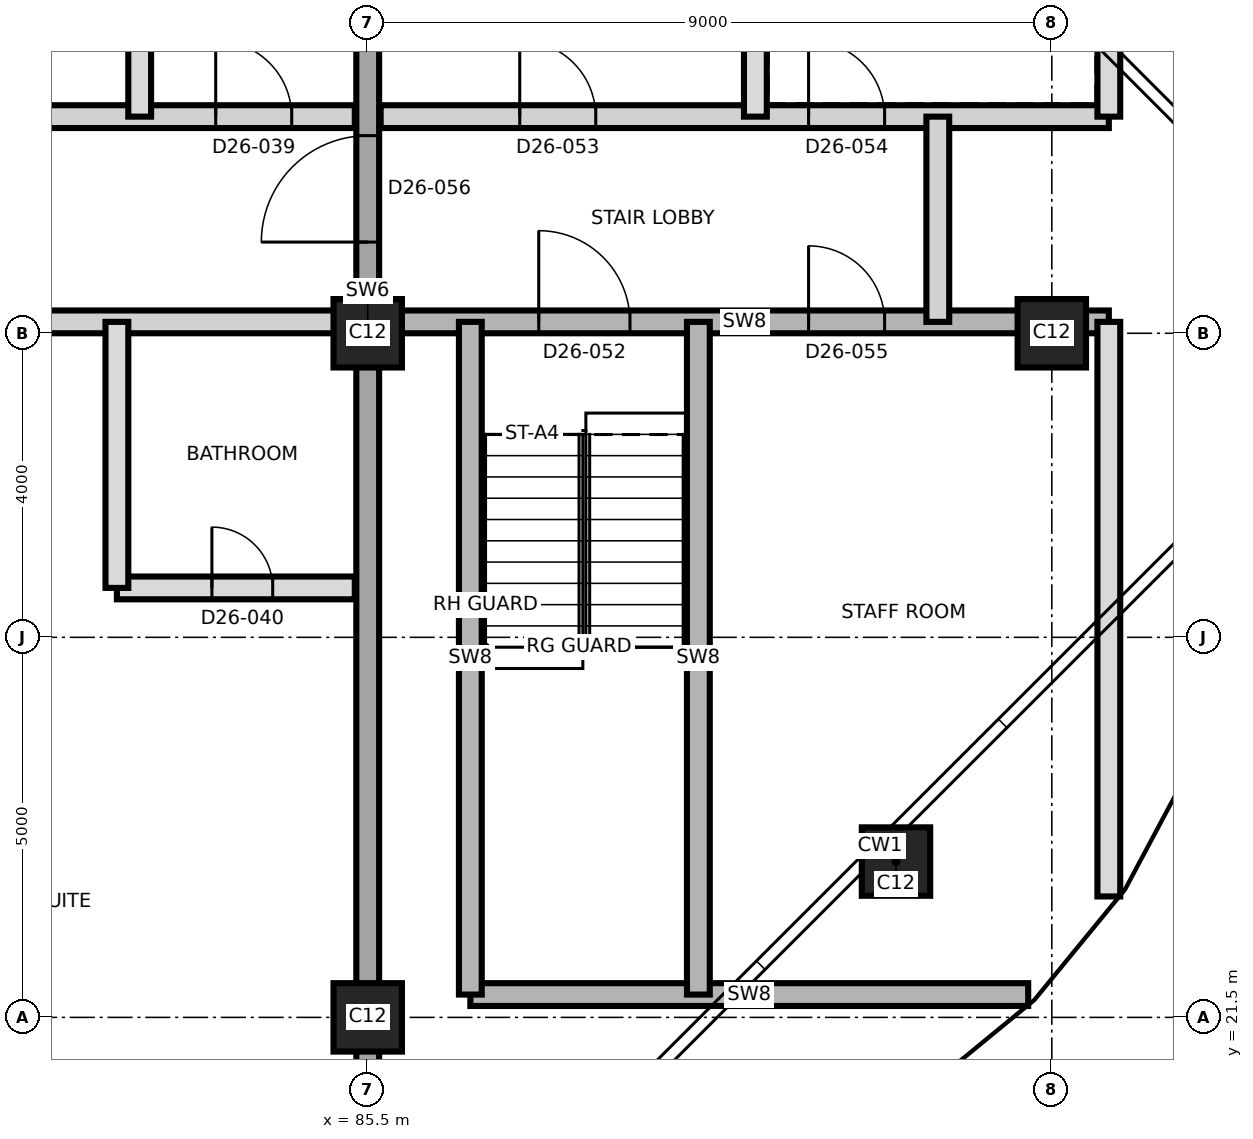
"""IFC4 building model, lengths in metres.
Left out: names, types, materials, properties, quantities, classifications, styles, units other than length and angle.
Written with IfcOpenShell. Run it as: python <this file> out.ifc"""

import sys

from ifc_helpers import new_model, si_unit, direction, frame, frame_2d, origin, origin_2d, place, context, subcontext, project, spatial, rectangle, extrude, element, fill, save


model = new_model("IFC4")
c1 = context("Model", 3, precision=1e-05, world=origin(), true_north=direction((0.0, 1.0)))
c2 = subcontext(c1, "Body", "Model", "MODEL_VIEW")
j1 = project(units=[si_unit("LENGTHUNIT", "METRE"), si_unit("PLANEANGLEUNIT", "RADIAN")], contexts=[c1])
p1 = place(None, origin())
s1 = spatial("IfcSite", under=j1, at=p1, CompositionType="ELEMENT")
p2 = place(p1, origin())
s2 = spatial("IfcBuilding", under=s1, at=p2, CompositionType="ELEMENT")
p3 = place(p2, frame((0.0, 0.0, 236.5)))
s3 = spatial("IfcBuildingStorey", under=s2, at=p3, CompositionType="ELEMENT", Elevation=236.5)
for number, where, z_axis, x_axis in (
    (1, (85.5, 21.5, 0.0), (0.0, 0.0, 1.0), (1.0, 0.0, 0.0)),
    (2, (92.45, 23.55, 0.0), (0.0, 0.0, 1.0), (1.0, 0.0, 0.0)),
    (3, (85.5, 30.5, 0.0), (0.0, 0.0, 1.0), (1.0, 0.0, 0.0)),
    (4, (94.5, 30.5, 0.0), (0.0, 0.0, 1.0), (1.0, 0.0, 0.0)),
):
    element("IfcColumn", number, at=place(p3, frame(where, z_axis=z_axis, x_axis=x_axis)), inside=s3, PredefinedType="COLUMN", context=c2, shape_type="SweptSolid", body=[
        extrude(rectangle(XDim=0.9, YDim=0.9, at=origin_2d()), origin(), (0.0, 0.0, 1.0), 3.7),
    ])
p4 = place(p3, frame((85.5, 19.275, 0.0), z_axis=(0.0, 0.0, 1.0), x_axis=(0.0, 1.0, 0.0)))
e5 = element("IfcWall", 5, at=p4, inside=s3, PredefinedType="SHEAR", context=c2, shape_type="SweptSolid", body=[
    extrude(rectangle(XDim=22.45, YDim=0.3, at=frame_2d((11.225, 0.0))), origin(), (0.0, 0.0, 1.0), 3.7),
])
p5 = place(p4, frame((12.425, 0.0, 0.0)))
e6 = element("IfcOpeningElement", 6, at=p5, cuts=e5, PredefinedType="OPENING", context=c2, shape_type="SweptSolid", body=[
    extrude(rectangle(XDim=1.4, YDim=2.1, at=frame_2d((0.7, 1.05))), frame((0.0, 0.16, 0.0), z_axis=(0.0, -1.0, 0.0), x_axis=(1.0, 0.0, 0.0)), (0.0, 0.0, 1.0), 0.32),
])
p6 = place(p3, frame((86.85, 21.8, 0.0), z_axis=(0.0, 0.0, 1.0), x_axis=(1.0, 0.0, 0.0)))
e7 = element("IfcWall", 7, at=p6, inside=s3, PredefinedType="SHEAR", context=c2, shape_type="SweptSolid", body=[
    extrude(rectangle(XDim=7.339, YDim=0.3, at=frame_2d((3.669, 0.0))), origin(), (0.0, 0.0, 1.0), 3.4),
])
p7 = place(p3, frame((82.2, 27.15, 0.0), z_axis=(0.0, 0.0, 1.0), x_axis=(1.0, 0.0, 0.0)))
e8 = element("IfcWall", 8, at=p7, inside=s3, PredefinedType="PARTITIONING", context=c2, shape_type="SweptSolid", body=[
    extrude(rectangle(XDim=3.13, YDim=0.3, at=frame_2d((1.565, 0.0))), origin(), (0.0, 0.0, 1.0), 3.4),
])
p8 = place(p7, frame((1.25, 0.0, 0.0)))
e9 = element("IfcOpeningElement", 9, at=p8, cuts=e8, PredefinedType="OPENING", context=c2, shape_type="SweptSolid", body=[
    extrude(rectangle(XDim=0.8, YDim=2.1, at=frame_2d((0.4, 1.05))), frame((0.0, 0.16, 0.0), z_axis=(0.0, -1.0, 0.0), x_axis=(1.0, 0.0, 0.0)), (0.0, 0.0, 1.0), 0.32),
])
p9 = place(p3, frame((58.55, 30.65, 0.0), z_axis=(0.0, 0.0, 1.0), x_axis=(1.0, 0.0, 0.0)))
e10 = element("IfcWall", 10, at=p9, inside=s3, PredefinedType="PARTITIONING", context=c2, shape_type="SweptSolid", body=[
    extrude(rectangle(XDim=26.78, YDim=0.3, at=frame_2d((13.39, 0.0))), origin(), (0.0, 0.0, 1.0), 3.4),
])
p10 = place(p9, frame((1.085, 0.0, 0.0)))
e11 = element("IfcOpeningElement", 11, at=p10, cuts=e10, PredefinedType="OPENING", context=c2, shape_type="SweptSolid", body=[
    extrude(rectangle(XDim=1.2, YDim=2.1, at=frame_2d((0.6, 1.05))), frame((0.0, 0.16, 0.0), z_axis=(0.0, -1.0, 0.0), x_axis=(1.0, 0.0, 0.0)), (0.0, 0.0, 1.0), 0.32),
])
p11 = place(p9, frame((4.335, 0.0, 0.0)))
e12 = element("IfcOpeningElement", 12, at=p11, cuts=e10, PredefinedType="OPENING", context=c2, shape_type="SweptSolid", body=[
    extrude(rectangle(XDim=1.0, YDim=2.1, at=frame_2d((0.5, 1.05))), frame((0.0, 0.16, 0.0), z_axis=(0.0, -1.0, 0.0), x_axis=(1.0, 0.0, 0.0)), (0.0, 0.0, 1.0), 0.32),
])
p12 = place(p9, frame((14.6, 0.0, 0.0)))
e13 = element("IfcOpeningElement", 13, at=p12, cuts=e10, PredefinedType="OPENING", context=c2, shape_type="SweptSolid", body=[
    extrude(rectangle(XDim=1.0, YDim=2.4, at=frame_2d((0.5, 1.2))), frame((0.0, 0.16, 0.0), z_axis=(0.0, -1.0, 0.0), x_axis=(1.0, 0.0, 0.0)), (0.0, 0.0, 1.0), 0.32),
])
p13 = place(p9, frame((20.3, 0.0, 0.0)))
e14 = element("IfcOpeningElement", 14, at=p13, cuts=e10, PredefinedType="OPENING", context=c2, shape_type="SweptSolid", body=[
    extrude(rectangle(XDim=1.0, YDim=2.4, at=frame_2d((0.5, 1.2))), frame((0.0, 0.16, 0.0), z_axis=(0.0, -1.0, 0.0), x_axis=(1.0, 0.0, 0.0)), (0.0, 0.0, 1.0), 0.32),
])
p14 = place(p3, frame((85.67, 30.65, 0.0), z_axis=(0.0, 0.0, 1.0), x_axis=(1.0, 0.0, 0.0)))
e15 = element("IfcWall", 15, at=p14, inside=s3, PredefinedType="SHEAR", context=c2, shape_type="SweptSolid", body=[
    extrude(rectangle(XDim=9.58, YDim=0.3, at=frame_2d((4.79, 0.0))), origin(), (0.0, 0.0, 1.0), 3.4),
])
p15 = place(p14, frame((2.08, 0.0, 0.0)))
e16 = element("IfcOpeningElement", 16, at=p15, cuts=e15, PredefinedType="OPENING", context=c2, shape_type="SweptSolid", body=[
    extrude(rectangle(XDim=1.2, YDim=2.1, at=frame_2d((0.6, 1.05))), frame((0.0, 0.16, 0.0), z_axis=(0.0, -1.0, 0.0), x_axis=(1.0, 0.0, 0.0)), (0.0, 0.0, 1.0), 0.32),
])
p16 = place(p14, frame((5.63, 0.0, 0.0)))
e17 = element("IfcOpeningElement", 17, at=p16, cuts=e15, PredefinedType="OPENING", context=c2, shape_type="SweptSolid", body=[
    extrude(rectangle(XDim=1.0, YDim=2.1, at=frame_2d((0.5, 1.05))), frame((0.0, 0.16, 0.0), z_axis=(0.0, -1.0, 0.0), x_axis=(1.0, 0.0, 0.0)), (0.0, 0.0, 1.0), 0.32),
])
p17 = place(p3, frame((58.55, 33.35, 0.0), z_axis=(0.0, 0.0, 1.0), x_axis=(1.0, 0.0, 0.0)))
e18 = element("IfcWall", 18, at=p17, inside=s3, PredefinedType="PARTITIONING", context=c2, shape_type="SweptSolid", body=[
    extrude(rectangle(XDim=26.78, YDim=0.3, at=frame_2d((13.39, 0.0))), origin(), (0.0, 0.0, 1.0), 3.4),
])
p18 = place(p17, frame((3.95, 0.0, 0.0)))
e19 = element("IfcOpeningElement", 19, at=p18, cuts=e18, PredefinedType="OPENING", context=c2, shape_type="SweptSolid", body=[
    extrude(rectangle(XDim=1.0, YDim=2.4, at=frame_2d((0.5, 1.2))), frame((0.0, 0.16, 0.0), z_axis=(0.0, -1.0, 0.0), x_axis=(1.0, 0.0, 0.0)), (0.0, 0.0, 1.0), 0.32),
])
p19 = place(p17, frame((12.365, 0.0, 0.0)))
e20 = element("IfcOpeningElement", 20, at=p19, cuts=e18, PredefinedType="OPENING", context=c2, shape_type="SweptSolid", body=[
    extrude(rectangle(XDim=1.0, YDim=2.1, at=frame_2d((0.5, 1.05))), frame((0.0, 0.16, 0.0), z_axis=(0.0, -1.0, 0.0), x_axis=(1.0, 0.0, 0.0)), (0.0, 0.0, 1.0), 0.32),
])
p20 = place(p17, frame((15.315, 0.0, 0.0)))
e21 = element("IfcOpeningElement", 21, at=p20, cuts=e18, PredefinedType="OPENING", context=c2, shape_type="SweptSolid", body=[
    extrude(rectangle(XDim=1.4, YDim=2.1, at=frame_2d((0.7, 1.05))), frame((0.0, 0.16, 0.0), z_axis=(0.0, -1.0, 0.0), x_axis=(1.0, 0.0, 0.0)), (0.0, 0.0, 1.0), 0.32),
])
p21 = place(p17, frame((19.1, 0.0, 0.0)))
e22 = element("IfcOpeningElement", 22, at=p21, cuts=e18, PredefinedType="OPENING", context=c2, shape_type="SweptSolid", body=[
    extrude(rectangle(XDim=1.0, YDim=2.1, at=frame_2d((0.5, 1.05))), frame((0.0, 0.16, 0.0), z_axis=(0.0, -1.0, 0.0), x_axis=(1.0, 0.0, 0.0)), (0.0, 0.0, 1.0), 0.32),
])
p22 = place(p17, frame((24.95, 0.0, 0.0)))
e23 = element("IfcOpeningElement", 23, at=p22, cuts=e18, PredefinedType="OPENING", context=c2, shape_type="SweptSolid", body=[
    extrude(rectangle(XDim=1.0, YDim=2.1, at=frame_2d((0.5, 1.05))), frame((0.0, 0.16, 0.0), z_axis=(0.0, -1.0, 0.0), x_axis=(1.0, 0.0, 0.0)), (0.0, 0.0, 1.0), 0.32),
])
p23 = place(p3, frame((85.67, 33.35, 0.0), z_axis=(0.0, 0.0, 1.0), x_axis=(1.0, 0.0, 0.0)))
e24 = element("IfcWall", 24, at=p23, inside=s3, PredefinedType="PARTITIONING", context=c2, shape_type="SweptSolid", body=[
    extrude(rectangle(XDim=9.58, YDim=0.3, at=frame_2d((4.79, 0.0))), origin(), (0.0, 0.0, 1.0), 3.4),
])
p24 = place(p23, frame((1.83, 0.0, 0.0)))
e25 = element("IfcOpeningElement", 25, at=p24, cuts=e24, PredefinedType="OPENING", context=c2, shape_type="SweptSolid", body=[
    extrude(rectangle(XDim=1.0, YDim=2.1, at=frame_2d((0.5, 1.05))), frame((0.0, 0.16, 0.0), z_axis=(0.0, -1.0, 0.0), x_axis=(1.0, 0.0, 0.0)), (0.0, 0.0, 1.0), 0.32),
])
p25 = place(p23, frame((5.63, 0.0, 0.0)))
e26 = element("IfcOpeningElement", 26, at=p25, cuts=e24, PredefinedType="OPENING", context=c2, shape_type="SweptSolid", body=[
    extrude(rectangle(XDim=1.0, YDim=2.1, at=frame_2d((0.5, 1.05))), frame((0.0, 0.16, 0.0), z_axis=(0.0, -1.0, 0.0), x_axis=(1.0, 0.0, 0.0)), (0.0, 0.0, 1.0), 0.32),
])
p26 = place(p3, frame((82.2, 27.15, 0.0), z_axis=(0.0, 0.0, 1.0), x_axis=(0.0, 1.0, 0.0)))
e27 = element("IfcWall", 27, at=p26, inside=s3, PredefinedType="PARTITIONING", context=c2, shape_type="SweptSolid", body=[
    extrude(rectangle(XDim=3.5, YDim=0.3, at=frame_2d((1.75, 0.0))), origin(), (0.0, 0.0, 1.0), 3.4),
])
p27 = place(p3, frame((82.5, 33.35, 0.0), z_axis=(0.0, 0.0, 1.0), x_axis=(0.0, 1.0, 0.0)))
e28 = element("IfcWall", 28, at=p27, inside=s3, PredefinedType="PARTITIONING", context=c2, shape_type="SweptSolid", body=[
    extrude(rectangle(XDim=8.555, YDim=0.3, at=frame_2d((4.277, 0.0))), origin(), (0.0, 0.0, 1.0), 3.4),
])
for number, where, z_axis, x_axis in (
    (29, (86.85, 21.8, 0.0), (0.0, 0.0, 1.0), (0.0, 1.0, 0.0)),
    (30, (89.85, 21.8, 0.0), (0.0, 0.0, 1.0), (0.0, 1.0, 0.0)),
):
    element("IfcWall", number, at=place(p3, frame(where, z_axis=z_axis, x_axis=x_axis)), inside=s3, PredefinedType="SHEAR", context=c2, shape_type="SweptSolid", body=[
        extrude(rectangle(XDim=8.85, YDim=0.3, at=frame_2d((4.425, 0.0))), origin(), (0.0, 0.0, 1.0), 3.4),
    ])
p28 = place(p3, frame((90.6, 33.35, 0.0), z_axis=(0.0, 0.0, 1.0), x_axis=(0.0, 1.0, 0.0)))
e31 = element("IfcWall", 31, at=p28, inside=s3, PredefinedType="PARTITIONING", context=c2, shape_type="SweptSolid", body=[
    extrude(rectangle(XDim=7.5, YDim=0.3, at=frame_2d((3.75, 0.0))), origin(), (0.0, 0.0, 1.0), 3.4),
])
p29 = place(p3, frame((93.0, 30.65, 0.0), z_axis=(0.0, 0.0, 1.0), x_axis=(0.0, 1.0, 0.0)))
e32 = element("IfcWall", 32, at=p29, inside=s3, PredefinedType="PARTITIONING", context=c2, shape_type="SweptSolid", body=[
    extrude(rectangle(XDim=2.7, YDim=0.3, at=frame_2d((1.35, 0.0))), origin(), (0.0, 0.0, 1.0), 3.4),
])
p30 = place(p3, frame((95.25, 23.091, 0.0), z_axis=(0.0, 0.0, 1.0), x_axis=(0.0, 1.0, 0.0)))
e33 = element("IfcWall", 33, at=p30, inside=s3, PredefinedType="PARTITIONING", context=c2, shape_type="SweptSolid", body=[
    extrude(rectangle(XDim=7.559, YDim=0.3, at=frame_2d((3.779, 0.0))), origin(), (0.0, 0.0, 1.0), 3.4),
])
p31 = place(p3, frame((95.25, 33.35, 0.0), z_axis=(0.0, 0.0, 1.0), x_axis=(0.0, 1.0, 0.0)))
e34 = element("IfcWall", 34, at=p31, inside=s3, PredefinedType="PARTITIONING", context=c2, shape_type="SweptSolid", body=[
    extrude(rectangle(XDim=4.559, YDim=0.3, at=frame_2d((2.279, 0.0))), origin(), (0.0, 0.0, 1.0), 3.4),
])
p32 = place(p22, origin())
e35 = element("IfcDoor", 35, at=p32, inside=s3, OperationType="SINGLE_SWING_LEFT", PredefinedType="DOOR", context=c2, shape_type="SweptSolid", body=[
    extrude(rectangle(XDim=1.0, YDim=2.1, at=frame_2d((0.5, 1.05))), frame((0.0, 0.025, 0.0), z_axis=(0.0, -1.0, 0.0), x_axis=(1.0, 0.0, 0.0)), (0.0, 0.0, 1.0), 0.05),
])
fill(e23, e35)
p33 = place(p8, origin())
e36 = element("IfcDoor", 36, at=p33, inside=s3, OperationType="SINGLE_SWING_LEFT", PredefinedType="DOOR", context=c2, shape_type="SweptSolid", body=[
    extrude(rectangle(XDim=0.8, YDim=2.1, at=frame_2d((0.4, 1.05))), frame((0.0, 0.025, 0.0), z_axis=(0.0, -1.0, 0.0), x_axis=(1.0, 0.0, 0.0)), (0.0, 0.0, 1.0), 0.05),
])
fill(e9, e36)
p34 = place(p15, origin())
e37 = element("IfcDoor", 37, at=p34, inside=s3, OperationType="SINGLE_SWING_LEFT", PredefinedType="DOOR", context=c2, shape_type="SweptSolid", body=[
    extrude(rectangle(XDim=1.2, YDim=2.1, at=frame_2d((0.6, 1.05))), frame((0.0, 0.025, 0.0), z_axis=(0.0, -1.0, 0.0), x_axis=(1.0, 0.0, 0.0)), (0.0, 0.0, 1.0), 0.05),
])
fill(e16, e37)
p35 = place(p24, origin())
e38 = element("IfcDoor", 38, at=p35, inside=s3, OperationType="SINGLE_SWING_LEFT", PredefinedType="DOOR", context=c2, shape_type="SweptSolid", body=[
    extrude(rectangle(XDim=1.0, YDim=2.1, at=frame_2d((0.5, 1.05))), frame((0.0, 0.025, 0.0), z_axis=(0.0, -1.0, 0.0), x_axis=(1.0, 0.0, 0.0)), (0.0, 0.0, 1.0), 0.05),
])
fill(e25, e38)
p36 = place(p25, origin())
e39 = element("IfcDoor", 39, at=p36, inside=s3, OperationType="SINGLE_SWING_RIGHT", PredefinedType="DOOR", context=c2, shape_type="SweptSolid", body=[
    extrude(rectangle(XDim=1.0, YDim=2.1, at=frame_2d((0.5, 1.05))), frame((0.0, 0.025, 0.0), z_axis=(0.0, -1.0, 0.0), x_axis=(1.0, 0.0, 0.0)), (0.0, 0.0, 1.0), 0.05),
])
fill(e26, e39)
p37 = place(p16, origin())
e40 = element("IfcDoor", 40, at=p37, inside=s3, OperationType="SINGLE_SWING_LEFT", PredefinedType="DOOR", context=c2, shape_type="SweptSolid", body=[
    extrude(rectangle(XDim=1.0, YDim=2.1, at=frame_2d((0.5, 1.05))), frame((0.0, 0.025, 0.0), z_axis=(0.0, -1.0, 0.0), x_axis=(1.0, 0.0, 0.0)), (0.0, 0.0, 1.0), 0.05),
])
fill(e17, e40)
p38 = place(p5, origin())
e41 = element("IfcDoor", 41, at=p38, inside=s3, OperationType="SINGLE_SWING_RIGHT", PredefinedType="DOOR", context=c2, shape_type="SweptSolid", body=[
    extrude(rectangle(XDim=1.4, YDim=2.1, at=frame_2d((0.7, 1.05))), frame((0.0, 0.025, 0.0), z_axis=(0.0, -1.0, 0.0), x_axis=(1.0, 0.0, 0.0)), (0.0, 0.0, 1.0), 0.05),
])
fill(e6, e41)
save(model, sys.argv[1])
